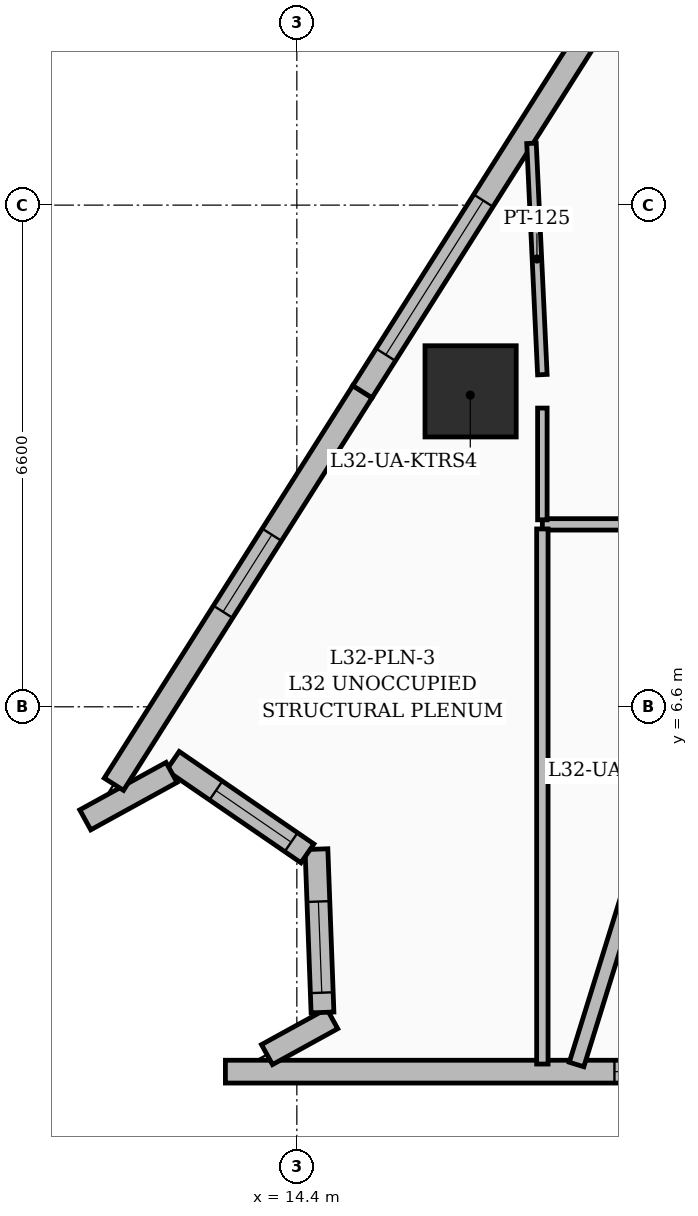
"""IFC4 building model, lengths in metres.
Left out: names, types, materials, properties, quantities, classifications, styles, units other than length and angle.
Written with IfcOpenShell. Run it as: python <this file> out.ifc"""

import sys

from ifc_helpers import new_model, si_unit, direction, frame, frame_2d, origin, origin_2d, place, context, subcontext, project, spatial, rectangle, extrude, element, fill, save


model = new_model("IFC4")
c1 = context("Model", 3, precision=1e-05, world=origin(), true_north=direction((0.0, 1.0)))
c2 = subcontext(c1, "Body", "Model", "MODEL_VIEW")
j1 = project(units=[si_unit("LENGTHUNIT", "METRE"), si_unit("PLANEANGLEUNIT", "RADIAN")], contexts=[c1])
p1 = place(None, origin())
s1 = spatial("IfcSite", under=j1, at=p1, CompositionType="ELEMENT")
p2 = place(p1, origin())
s2 = spatial("IfcBuilding", under=s1, at=p2, CompositionType="ELEMENT")
p3 = place(p2, frame((0.0, 0.0, 128.4)))
s3 = spatial("IfcBuildingStorey", under=s2, at=p3, CompositionType="ELEMENT", Elevation=128.4)
p4 = place(p3, frame((16.686, 10.75, 0.0), z_axis=(0.0, 0.0, 1.0), x_axis=(1.0, 0.0, 0.0)))
e1 = element("IfcColumn", 1, at=p4, inside=s3, PredefinedType="COLUMN", context=c2, shape_type="SweptSolid", body=[
    extrude(rectangle(XDim=1.2, YDim=1.2, at=origin_2d()), origin(), (0.0, 0.0, 1.0), 3.6),
])
p5 = place(p3, frame((20.453, 1.8, 0.0), z_axis=(0.0, 0.0, 1.0), x_axis=(-1.0, 0.0, 0.0)))
e2 = element("IfcWall", 2, at=p5, inside=s3, PredefinedType="SOLIDWALL", context=c2, shape_type="SweptSolid", body=[
    extrude(rectangle(XDim=6.993, YDim=0.3, at=frame_2d((3.497, 0.0))), origin(), (0.0, 0.0, 1.0), 3.35),
])
p6 = place(p5, frame((0.675, 0.0, 0.8)))
e3 = element("IfcOpeningElement", 3, at=p6, cuts=e2, PredefinedType="OPENING", context=c2, shape_type="SweptSolid", body=[
    extrude(rectangle(XDim=1.2, YDim=1.8, at=frame_2d((0.6, 0.9))), frame((0.0, 0.16, 0.0), z_axis=(0.0, -1.0, 0.0), x_axis=(1.0, 0.0, 0.0)), (0.0, 0.0, 1.0), 0.32),
])
p7 = place(p3, frame((14.007, 2.024, 0.0), z_axis=(0.0, 0.0, 1.0), x_axis=(0.876089618579, 0.482148296914, 0.0)))
e4 = element("IfcWall", 4, at=p7, inside=s3, PredefinedType="SOLIDWALL", context=c2, shape_type="SweptSolid", body=[
    extrude(rectangle(XDim=0.98, YDim=0.3, at=frame_2d((0.49, 0.0))), origin(), (0.0, 0.0, 1.0), 3.35),
])
p8 = place(p3, frame((14.738, 2.579, 0.0), z_axis=(0.0, 0.0, 1.0), x_axis=(-0.037141892545, 0.99931000186, 0.0)))
e5 = element("IfcWall", 5, at=p8, inside=s3, PredefinedType="SOLIDWALL", context=c2, shape_type="SweptSolid", body=[
    extrude(rectangle(XDim=2.149, YDim=0.3, at=frame_2d((1.075, 0.0))), origin(), (0.0, 0.0, 1.0), 3.35),
])
p9 = place(p8, frame((0.26, 0.0, 0.8)))
e6 = element("IfcOpeningElement", 6, at=p9, cuts=e5, PredefinedType="OPENING", context=c2, shape_type="SweptSolid", body=[
    extrude(rectangle(XDim=1.2, YDim=1.8, at=frame_2d((0.6, 0.9))), frame((0.0, 0.16, 0.0), z_axis=(0.0, -1.0, 0.0), x_axis=(1.0, 0.0, 0.0)), (0.0, 0.0, 1.0), 0.32),
])
p10 = place(p3, frame((14.539, 4.672, 0.0), z_axis=(0.0, 0.0, 1.0), x_axis=(-0.824422928204, 0.565974235678, 0.0)))
e7 = element("IfcWall", 7, at=p10, inside=s3, PredefinedType="SOLIDWALL", context=c2, shape_type="SweptSolid", body=[
    extrude(rectangle(XDim=2.149, YDim=0.3, at=frame_2d((1.075, 0.0))), origin(), (0.0, 0.0, 1.0), 3.35),
])
p11 = place(p10, frame((0.26, 0.0, 0.8)))
e8 = element("IfcOpeningElement", 8, at=p11, cuts=e7, PredefinedType="OPENING", context=c2, shape_type="SweptSolid", body=[
    extrude(rectangle(XDim=1.2, YDim=1.8, at=frame_2d((0.6, 0.9))), frame((0.0, 0.16, 0.0), z_axis=(0.0, -1.0, 0.0), x_axis=(1.0, 0.0, 0.0)), (0.0, 0.0, 1.0), 0.32),
])
p12 = place(p3, frame((12.752, 5.737, 0.0), z_axis=(0.0, 0.0, 1.0), x_axis=(-0.876299432815, -0.481766856527, 0.0)))
e9 = element("IfcWall", 9, at=p12, inside=s3, PredefinedType="SOLIDWALL", context=c2, shape_type="SweptSolid", body=[
    extrude(rectangle(XDim=1.296, YDim=0.3, at=frame_2d((0.648, 0.0))), origin(), (0.0, 0.0, 1.0), 3.35),
])
p13 = place(p3, frame((11.993, 5.581, 0.0), z_axis=(0.0, 0.0, 1.0), x_axis=(0.534883870605, 0.844925585461, 0.0)))
e10 = element("IfcWall", 10, at=p13, inside=s3, PredefinedType="SOLIDWALL", context=c2, shape_type="SweptSolid", body=[
    extrude(rectangle(XDim=6.112, YDim=0.3, at=frame_2d((3.056, 0.0))), origin(), (0.0, 0.0, 1.0), 3.35),
])
p14 = place(p13, frame((2.685, 0.0, 0.8)))
e11 = element("IfcOpeningElement", 11, at=p14, cuts=e10, PredefinedType="OPENING", context=c2, shape_type="SweptSolid", body=[
    extrude(rectangle(XDim=1.2, YDim=1.8, at=frame_2d((0.6, 0.9))), frame((0.0, 0.16, 0.0), z_axis=(0.0, -1.0, 0.0), x_axis=(1.0, 0.0, 0.0)), (0.0, 0.0, 1.0), 0.32),
])
p15 = place(p3, frame((15.262, 10.746, 0.0), z_axis=(0.0, 0.0, 1.0), x_axis=(0.534880248718, 0.844927878302, 0.0)))
e12 = element("IfcWall", 12, at=p15, inside=s3, PredefinedType="SOLIDWALL", context=c2, shape_type="SweptSolid", body=[
    extrude(rectangle(XDim=6.727, YDim=0.3, at=frame_2d((3.364, 0.0))), origin(), (0.0, 0.0, 1.0), 3.35),
])
p16 = place(p15, frame((0.575, 0.0, 0.6)))
e13 = element("IfcOpeningElement", 13, at=p16, cuts=e12, PredefinedType="OPENING", context=c2, shape_type="SweptSolid", body=[
    extrude(rectangle(XDim=2.4, YDim=2.1, at=frame_2d((1.2, 1.05))), frame((0.0, 0.16, 0.0), z_axis=(0.0, -1.0, 0.0), x_axis=(1.0, 0.0, 0.0)), (0.0, 0.0, 1.0), 0.32),
])
p17 = place(p3, frame((19.232, 5.603, 0.0), z_axis=(0.0, 0.0, 1.0), x_axis=(-0.296660209707, -0.954983099315, 0.0)))
e14 = element("IfcWall", 14, at=p17, inside=s3, PredefinedType="PARTITIONING", context=c2, shape_type="SweptSolid", body=[
    extrude(rectangle(XDim=3.884, YDim=0.2, at=frame_2d((1.942, 0.0))), origin(), (0.0, 0.0, 1.0), 3.35),
])
p18 = place(p3, frame((17.63, 9.0, 0.0), z_axis=(0.0, 0.0, 1.0), x_axis=(1.0, 0.0, 0.0)))
e15 = element("IfcWall", 15, at=p18, inside=s3, PredefinedType="PARTITIONING", context=c2, shape_type="SweptSolid", body=[
    extrude(rectangle(XDim=2.625, YDim=0.15, at=frame_2d((1.312, 0.0))), origin(), (0.0, 0.0, 1.0), 1.12),
])
p19 = place(p3, frame((17.63, 10.53, 0.0), z_axis=(0.0, 0.0, 1.0), x_axis=(0.0, -1.0, 0.0)))
e16 = element("IfcWall", 16, at=p19, inside=s3, PredefinedType="PARTITIONING", context=c2, shape_type="SweptSolid", body=[
    extrude(rectangle(XDim=1.47, YDim=0.125, at=frame_2d((0.735, 0.0))), origin(), (0.0, 0.0, 1.0), 1.12),
])
p20 = place(p3, frame((17.487, 14.013, 0.0), z_axis=(0.0, 0.0, 1.0), x_axis=(0.046883561563, -0.998900361225, 0.0)))
e17 = element("IfcWall", 17, at=p20, inside=s3, PredefinedType="PARTITIONING", context=c2, shape_type="SweptSolid", body=[
    extrude(rectangle(XDim=3.046, YDim=0.125, at=frame_2d((1.523, 0.0))), origin(), (0.0, 0.0, 1.0), 1.12),
])
p21 = place(p3, frame((17.63, 8.94, 0.0), z_axis=(0.0, 0.0, 1.0), x_axis=(0.0, -1.0, 0.0)))
e18 = element("IfcWall", 18, at=p21, inside=s3, PredefinedType="PARTITIONING", context=c2, shape_type="SweptSolid", body=[
    extrude(rectangle(XDim=7.04, YDim=0.15, at=frame_2d((3.52, 0.0))), origin(), (0.0, 0.0, 1.0), 2.57),
])
p22 = place(p6, origin())
e19 = element("IfcWindow", 19, at=p22, inside=s3, PartitioningType="SINGLE_PANEL", PredefinedType="WINDOW", context=c2, shape_type="SweptSolid", body=[
    extrude(rectangle(XDim=1.2, YDim=1.8, at=frame_2d((0.6, 0.9))), frame((0.0, 0.03, 0.0), z_axis=(0.0, -1.0, 0.0), x_axis=(1.0, 0.0, 0.0)), (0.0, 0.0, 1.0), 0.06),
])
fill(e3, e19)
p23 = place(p9, origin())
e20 = element("IfcWindow", 20, at=p23, inside=s3, PartitioningType="SINGLE_PANEL", PredefinedType="WINDOW", context=c2, shape_type="SweptSolid", body=[
    extrude(rectangle(XDim=1.2, YDim=1.8, at=frame_2d((0.6, 0.9))), frame((0.0, 0.03, 0.0), z_axis=(0.0, -1.0, 0.0), x_axis=(1.0, 0.0, 0.0)), (0.0, 0.0, 1.0), 0.06),
])
fill(e6, e20)
p24 = place(p11, origin())
e21 = element("IfcWindow", 21, at=p24, inside=s3, PartitioningType="SINGLE_PANEL", PredefinedType="WINDOW", context=c2, shape_type="SweptSolid", body=[
    extrude(rectangle(XDim=1.2, YDim=1.8, at=frame_2d((0.6, 0.9))), frame((0.0, 0.03, 0.0), z_axis=(0.0, -1.0, 0.0), x_axis=(1.0, 0.0, 0.0)), (0.0, 0.0, 1.0), 0.06),
])
fill(e8, e21)
p25 = place(p14, origin())
e22 = element("IfcWindow", 22, at=p25, inside=s3, PartitioningType="SINGLE_PANEL", PredefinedType="WINDOW", context=c2, shape_type="SweptSolid", body=[
    extrude(rectangle(XDim=1.2, YDim=1.8, at=frame_2d((0.6, 0.9))), frame((0.0, 0.03, 0.0), z_axis=(0.0, -1.0, 0.0), x_axis=(1.0, 0.0, 0.0)), (0.0, 0.0, 1.0), 0.06),
])
fill(e11, e22)
p26 = place(p16, origin())
e23 = element("IfcWindow", 23, at=p26, inside=s3, PartitioningType="SINGLE_PANEL", PredefinedType="WINDOW", context=c2, shape_type="SweptSolid", body=[
    extrude(rectangle(XDim=2.4, YDim=2.1, at=frame_2d((1.2, 1.05))), frame((0.0, 0.03, 0.0), z_axis=(0.0, -1.0, 0.0), x_axis=(1.0, 0.0, 0.0)), (0.0, 0.0, 1.0), 0.06),
])
fill(e13, e23)
save(model, sys.argv[1])
